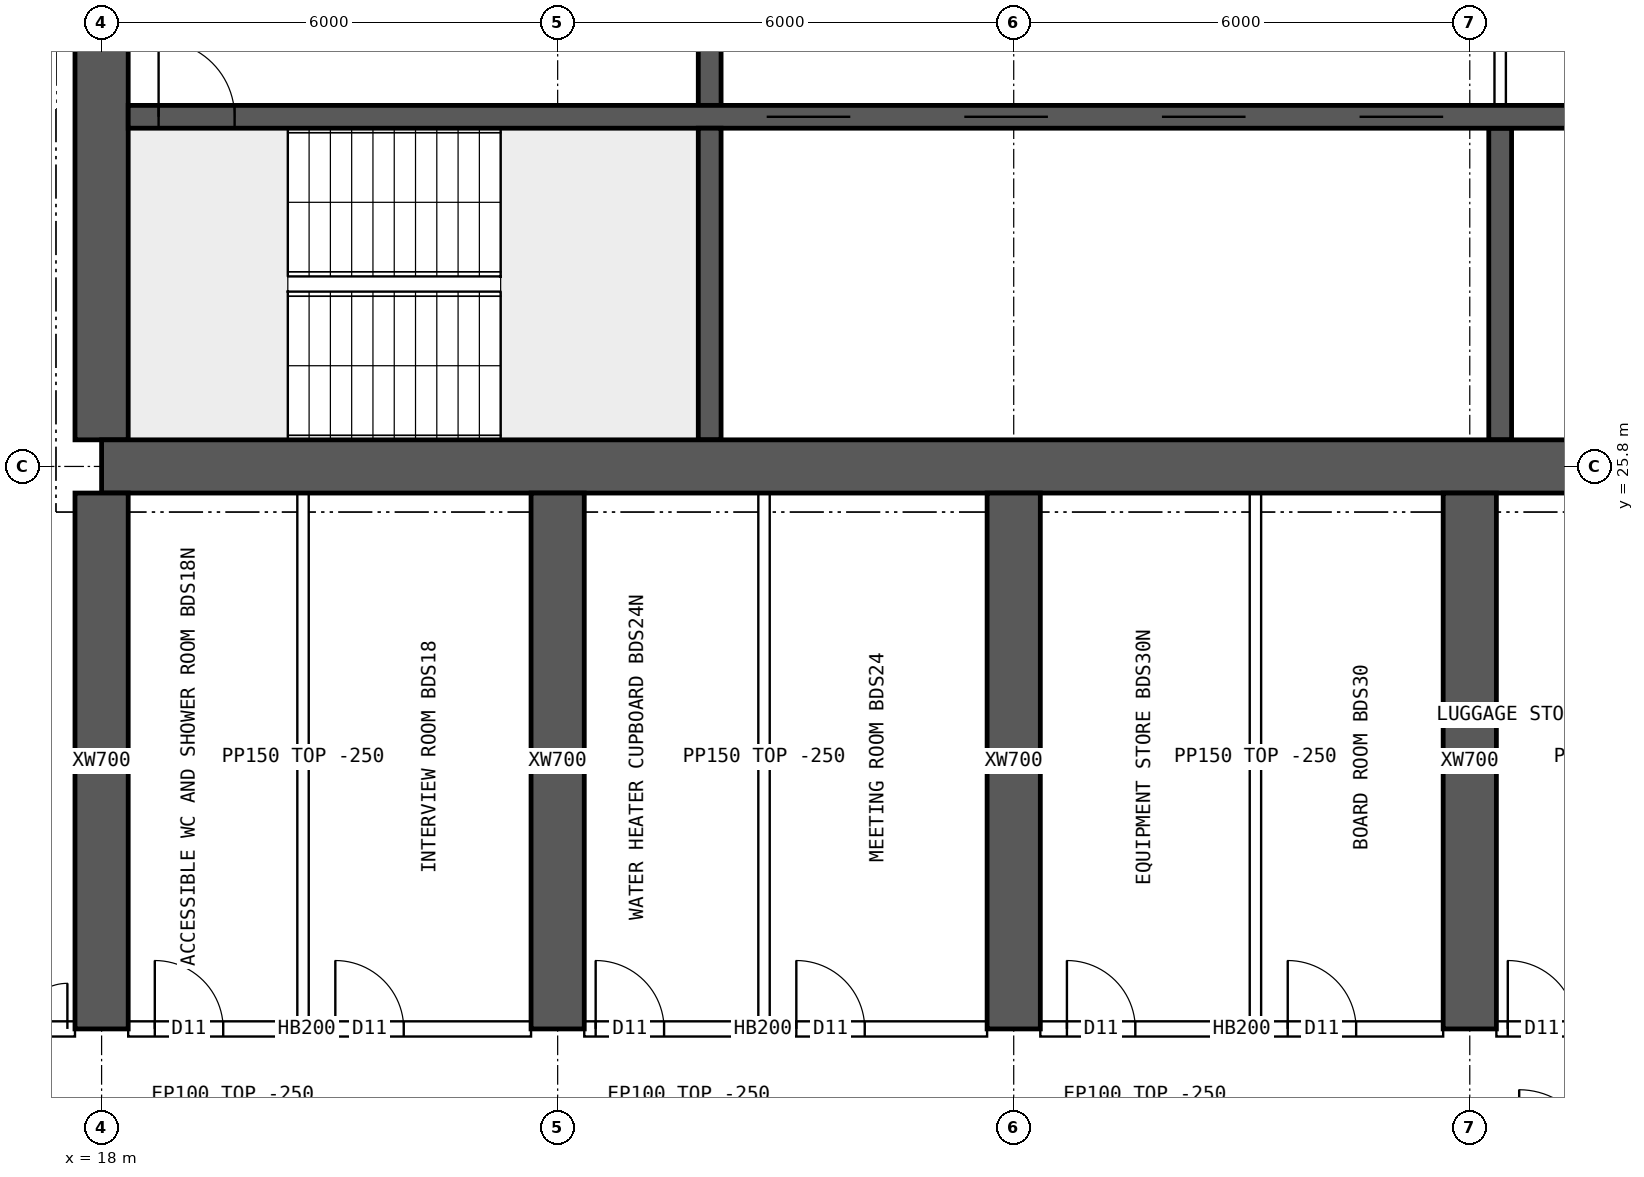
"""IFC4 building model, lengths in metres.
Left out: names, types, materials, properties, quantities, classifications, styles, units other than length and angle.
Written with IfcOpenShell. Run it as: python <this file> out.ifc"""

import sys

from ifc_helpers import new_model, si_unit, direction, frame, frame_2d, origin, place, context, subcontext, project, spatial, rectangle, extrude, element, fill, save


model = new_model("IFC4")
c1 = context("Model", 3, precision=1e-05, world=origin(), true_north=direction((0.0, 1.0)))
c2 = subcontext(c1, "Body", "Model", "MODEL_VIEW")
j1 = project(units=[si_unit("LENGTHUNIT", "METRE"), si_unit("PLANEANGLEUNIT", "RADIAN")], contexts=[c1])
p1 = place(None, origin())
s1 = spatial("IfcSite", under=j1, at=p1, CompositionType="ELEMENT")
p2 = place(p1, origin())
s2 = spatial("IfcBuilding", under=s1, at=p2, CompositionType="ELEMENT")
p3 = place(p2, frame((0.0, 0.0, 239.05)))
s3 = spatial("IfcBuildingStorey", under=s2, at=p3, CompositionType="ELEMENT", Elevation=239.05)
p4 = place(p3, frame((18.0, 25.8, 0.0), z_axis=(0.0, 0.0, 1.0), x_axis=(1.0, 0.0, 0.0)))
e1 = element("IfcWall", 1, at=p4, inside=s3, PredefinedType="SHEAR", context=c2, shape_type="SweptSolid", body=[
    extrude(rectangle(XDim=48.0, YDim=0.7, at=frame_2d((24.0, 0.0))), origin(), (0.0, 0.0, 1.0), 3.75),
])
p5 = place(p3, frame((18.0, 26.15, 0.0), z_axis=(0.0, 0.0, 1.0), x_axis=(0.0, 1.0, 0.0)))
e2 = element("IfcWall", 2, at=p5, inside=s3, PredefinedType="SHEAR", context=c2, shape_type="SweptSolid", body=[
    extrude(rectangle(XDim=11.7, YDim=0.7, at=frame_2d((5.85, 0.0))), origin(), (0.0, 0.0, 1.0), 3.75),
])
p6 = place(p5, frame((5.15, 0.0, 0.0)))
e3 = element("IfcOpeningElement", 3, at=p6, cuts=e2, PredefinedType="OPENING", context=c2, shape_type="SweptSolid", body=[
    extrude(rectangle(XDim=1.2, YDim=2.1, at=frame_2d((0.6, 1.05))), frame((0.0, 0.36, 0.0), z_axis=(0.0, -1.0, 0.0), x_axis=(1.0, 0.0, 0.0)), (0.0, 0.0, 1.0), 0.72),
])
p7 = place(p3, frame((18.35, 30.4, 0.0), z_axis=(0.0, 0.0, 1.0), x_axis=(1.0, 0.0, 0.0)))
e4 = element("IfcWall", 4, at=p7, inside=s3, PredefinedType="SHEAR", context=c2, shape_type="SweptSolid", body=[
    extrude(rectangle(XDim=47.3, YDim=0.3, at=frame_2d((23.65, 0.0))), origin(), (0.0, 0.0, 1.0), 3.75),
])
p8 = place(p7, frame((0.4, 0.0, 0.0)))
e5 = element("IfcOpeningElement", 5, at=p8, cuts=e4, PredefinedType="OPENING", context=c2, shape_type="SweptSolid", body=[
    extrude(rectangle(XDim=1.0, YDim=2.1, at=frame_2d((0.5, 1.05))), frame((0.0, 0.16, 0.0), z_axis=(0.0, -1.0, 0.0), x_axis=(1.0, 0.0, 0.0)), (0.0, 0.0, 1.0), 0.32),
])
p9 = place(p7, frame((45.9, 0.0, 0.0)))
e6 = element("IfcOpeningElement", 6, at=p9, cuts=e4, PredefinedType="OPENING", context=c2, shape_type="SweptSolid", body=[
    extrude(rectangle(XDim=1.0, YDim=2.1, at=frame_2d((0.5, 1.05))), frame((0.0, 0.16, 0.0), z_axis=(0.0, -1.0, 0.0), x_axis=(1.0, 0.0, 0.0)), (0.0, 0.0, 1.0), 0.32),
])
p10 = place(p7, frame((8.4, 0.0, 0.0)))
e7 = element("IfcOpeningElement", 7, at=p10, cuts=e4, PredefinedType="OPENING", context=c2, shape_type="SweptSolid", body=[
    extrude(rectangle(XDim=1.1, YDim=2.1, at=frame_2d((0.55, 1.05))), frame((0.0, 0.16, 0.0), z_axis=(0.0, -1.0, 0.0), x_axis=(1.0, 0.0, 0.0)), (0.0, 0.0, 1.0), 0.32),
])
p11 = place(p7, frame((11.0, 0.0, 0.0)))
e8 = element("IfcOpeningElement", 8, at=p11, cuts=e4, PredefinedType="OPENING", context=c2, shape_type="SweptSolid", body=[
    extrude(rectangle(XDim=1.1, YDim=2.1, at=frame_2d((0.55, 1.05))), frame((0.0, 0.16, 0.0), z_axis=(0.0, -1.0, 0.0), x_axis=(1.0, 0.0, 0.0)), (0.0, 0.0, 1.0), 0.32),
])
p12 = place(p7, frame((13.6, 0.0, 0.0)))
e9 = element("IfcOpeningElement", 9, at=p12, cuts=e4, PredefinedType="OPENING", context=c2, shape_type="SweptSolid", body=[
    extrude(rectangle(XDim=1.1, YDim=2.1, at=frame_2d((0.55, 1.05))), frame((0.0, 0.16, 0.0), z_axis=(0.0, -1.0, 0.0), x_axis=(1.0, 0.0, 0.0)), (0.0, 0.0, 1.0), 0.32),
])
p13 = place(p7, frame((16.2, 0.0, 0.0)))
e10 = element("IfcOpeningElement", 10, at=p13, cuts=e4, PredefinedType="OPENING", context=c2, shape_type="SweptSolid", body=[
    extrude(rectangle(XDim=1.1, YDim=2.1, at=frame_2d((0.55, 1.05))), frame((0.0, 0.16, 0.0), z_axis=(0.0, -1.0, 0.0), x_axis=(1.0, 0.0, 0.0)), (0.0, 0.0, 1.0), 0.32),
])
p14 = place(p7, frame((18.975, 0.0, 0.0)))
e11 = element("IfcOpeningElement", 11, at=p14, cuts=e4, PredefinedType="OPENING", context=c2, shape_type="SweptSolid", body=[
    extrude(rectangle(XDim=0.9, YDim=2.1, at=frame_2d((0.45, 1.05))), frame((0.0, 0.16, 0.0), z_axis=(0.0, -1.0, 0.0), x_axis=(1.0, 0.0, 0.0)), (0.0, 0.0, 1.0), 0.32),
])
p15 = place(p7, frame((24.475, 0.0, 0.0)))
e12 = element("IfcOpeningElement", 12, at=p15, cuts=e4, PredefinedType="OPENING", context=c2, shape_type="SweptSolid", body=[
    extrude(rectangle(XDim=0.9, YDim=2.1, at=frame_2d((0.45, 1.05))), frame((0.0, 0.16, 0.0), z_axis=(0.0, -1.0, 0.0), x_axis=(1.0, 0.0, 0.0)), (0.0, 0.0, 1.0), 0.32),
])
p16 = place(p7, frame((30.267, 0.0, 0.0)))
e13 = element("IfcOpeningElement", 13, at=p16, cuts=e4, PredefinedType="OPENING", context=c2, shape_type="SweptSolid", body=[
    extrude(rectangle(XDim=1.1, YDim=2.1, at=frame_2d((0.55, 1.05))), frame((0.0, 0.16, 0.0), z_axis=(0.0, -1.0, 0.0), x_axis=(1.0, 0.0, 0.0)), (0.0, 0.0, 1.0), 0.32),
])
p17 = place(p7, frame((33.8, 0.0, 0.0)))
e14 = element("IfcOpeningElement", 14, at=p17, cuts=e4, PredefinedType="OPENING", context=c2, shape_type="SweptSolid", body=[
    extrude(rectangle(XDim=1.1, YDim=2.1, at=frame_2d((0.55, 1.05))), frame((0.0, 0.16, 0.0), z_axis=(0.0, -1.0, 0.0), x_axis=(1.0, 0.0, 0.0)), (0.0, 0.0, 1.0), 0.32),
])
p18 = place(p7, frame((37.333, 0.0, 0.0)))
e15 = element("IfcOpeningElement", 15, at=p18, cuts=e4, PredefinedType="OPENING", context=c2, shape_type="SweptSolid", body=[
    extrude(rectangle(XDim=1.1, YDim=2.1, at=frame_2d((0.55, 1.05))), frame((0.0, 0.16, 0.0), z_axis=(0.0, -1.0, 0.0), x_axis=(1.0, 0.0, 0.0)), (0.0, 0.0, 1.0), 0.32),
])
p19 = place(p3, frame((26.0, 26.15, 0.0), z_axis=(0.0, 0.0, 1.0), x_axis=(0.0, 1.0, 0.0)))
e16 = element("IfcWall", 16, at=p19, inside=s3, PredefinedType="SHEAR", context=c2, shape_type="SweptSolid", body=[
    extrude(rectangle(XDim=4.1, YDim=0.3, at=frame_2d((2.05, 0.0))), origin(), (0.0, 0.0, 1.0), 3.75),
])
p20 = place(p3, frame((26.0, 30.55, 0.0), z_axis=(0.0, 0.0, 1.0), x_axis=(0.0, 1.0, 0.0)))
e17 = element("IfcWall", 17, at=p20, inside=s3, PredefinedType="SHEAR", context=c2, shape_type="SweptSolid", body=[
    extrude(rectangle(XDim=3.9, YDim=0.3, at=frame_2d((1.95, 0.0))), origin(), (0.0, 0.0, 1.0), 3.75),
])
p21 = place(p20, frame((1.4, 0.0, 0.0)))
e18 = element("IfcOpeningElement", 18, at=p21, cuts=e17, PredefinedType="OPENING", context=c2, shape_type="SweptSolid", body=[
    extrude(rectangle(XDim=1.2, YDim=2.1, at=frame_2d((0.6, 1.05))), frame((0.0, 0.16, 0.0), z_axis=(0.0, -1.0, 0.0), x_axis=(1.0, 0.0, 0.0)), (0.0, 0.0, 1.0), 0.32),
])
p22 = place(p3, frame((36.4, 26.15, 0.0), z_axis=(0.0, 0.0, 1.0), x_axis=(0.0, 1.0, 0.0)))
e19 = element("IfcWall", 19, at=p22, inside=s3, PredefinedType="SHEAR", context=c2, shape_type="SweptSolid", body=[
    extrude(rectangle(XDim=4.1, YDim=0.3, at=frame_2d((2.05, 0.0))), origin(), (0.0, 0.0, 1.0), 3.75),
])
for number, where, z_axis, x_axis in (
    (20, (18.0, 18.4, 0.0), (0.0, 0.0, 1.0), (0.0, 1.0, 0.0)),
    (21, (24.0, 18.4, 0.0), (0.0, 0.0, 1.0), (0.0, 1.0, 0.0)),
    (22, (30.0, 18.4, 0.0), (0.0, 0.0, 1.0), (0.0, 1.0, 0.0)),
    (23, (36.0, 18.4, 0.0), (0.0, 0.0, 1.0), (0.0, 1.0, 0.0)),
):
    element("IfcWall", number, at=place(p3, frame(where, z_axis=z_axis, x_axis=x_axis)), inside=s3, PredefinedType="SHEAR", context=c2, shape_type="SweptSolid", body=[
        extrude(rectangle(XDim=7.05, YDim=0.7, at=frame_2d((3.525, 0.0))), origin(), (0.0, 0.0, 1.0), 3.75),
    ])
p23 = place(p3, frame((36.4, 30.55, 0.0), z_axis=(0.0, 0.0, 1.0), x_axis=(0.0, 1.0, 0.0)))
e24 = element("IfcWall", 24, at=p23, inside=s3, PredefinedType="SOLIDWALL", context=c2, shape_type="SweptSolid", body=[
    extrude(rectangle(XDim=3.9, YDim=0.15, at=frame_2d((1.95, 0.0))), origin(), (0.0, 0.0, 1.0), 3.5),
])
p24 = place(p23, frame((1.15, 0.0, 0.0)))
e25 = element("IfcOpeningElement", 25, at=p24, cuts=e24, PredefinedType="OPENING", context=c2, shape_type="SweptSolid", body=[
    extrude(rectangle(XDim=1.6, YDim=2.1, at=frame_2d((0.8, 1.05))), frame((0.0, 0.085, 0.0), z_axis=(0.0, -1.0, 0.0), x_axis=(1.0, 0.0, 0.0)), (0.0, 0.0, 1.0), 0.17),
])
p25 = place(p3, frame((15.6, 18.4, 0.0), z_axis=(0.0, 0.0, 1.0), x_axis=(1.0, 0.0, 0.0)))
e26 = element("IfcWall", 26, at=p25, inside=s3, PredefinedType="SOLIDWALL", context=c2, shape_type="SweptSolid", body=[
    extrude(rectangle(XDim=2.05, YDim=0.2, at=frame_2d((1.025, 0.0))), origin(), (0.0, 0.0, 1.0), 3.5),
])
p26 = place(p25, frame((0.75, 0.0, 0.0)))
e27 = element("IfcOpeningElement", 27, at=p26, cuts=e26, PredefinedType="OPENING", context=c2, shape_type="SweptSolid", body=[
    extrude(rectangle(XDim=1.2, YDim=2.1, at=frame_2d((0.6, 1.05))), frame((0.0, 0.11, 0.0), z_axis=(0.0, -1.0, 0.0), x_axis=(1.0, 0.0, 0.0)), (0.0, 0.0, 1.0), 0.22),
])
p27 = place(p3, frame((18.35, 18.4, 0.0), z_axis=(0.0, 0.0, 1.0), x_axis=(1.0, 0.0, 0.0)))
e28 = element("IfcWall", 28, at=p27, inside=s3, PredefinedType="SOLIDWALL", context=c2, shape_type="SweptSolid", body=[
    extrude(rectangle(XDim=5.3, YDim=0.2, at=frame_2d((2.65, 0.0))), origin(), (0.0, 0.0, 1.0), 3.5),
])
p28 = place(p27, frame((0.35, 0.0, 0.0)))
e29 = element("IfcOpeningElement", 29, at=p28, cuts=e28, PredefinedType="OPENING", context=c2, shape_type="SweptSolid", body=[
    extrude(rectangle(XDim=0.9, YDim=2.1, at=frame_2d((0.45, 1.05))), frame((0.0, 0.11, 0.0), z_axis=(0.0, -1.0, 0.0), x_axis=(1.0, 0.0, 0.0)), (0.0, 0.0, 1.0), 0.22),
])
p29 = place(p27, frame((2.725, 0.0, 0.0)))
e30 = element("IfcOpeningElement", 30, at=p29, cuts=e28, PredefinedType="OPENING", context=c2, shape_type="SweptSolid", body=[
    extrude(rectangle(XDim=0.9, YDim=2.1, at=frame_2d((0.45, 1.05))), frame((0.0, 0.11, 0.0), z_axis=(0.0, -1.0, 0.0), x_axis=(1.0, 0.0, 0.0)), (0.0, 0.0, 1.0), 0.22),
])
p30 = place(p3, frame((24.35, 18.4, 0.0), z_axis=(0.0, 0.0, 1.0), x_axis=(1.0, 0.0, 0.0)))
e31 = element("IfcWall", 31, at=p30, inside=s3, PredefinedType="SOLIDWALL", context=c2, shape_type="SweptSolid", body=[
    extrude(rectangle(XDim=5.3, YDim=0.2, at=frame_2d((2.65, 0.0))), origin(), (0.0, 0.0, 1.0), 3.5),
])
p31 = place(p30, frame((0.15, 0.0, 0.0)))
e32 = element("IfcOpeningElement", 32, at=p31, cuts=e31, PredefinedType="OPENING", context=c2, shape_type="SweptSolid", body=[
    extrude(rectangle(XDim=0.9, YDim=2.1, at=frame_2d((0.45, 1.05))), frame((0.0, 0.11, 0.0), z_axis=(0.0, -1.0, 0.0), x_axis=(1.0, 0.0, 0.0)), (0.0, 0.0, 1.0), 0.22),
])
p32 = place(p30, frame((2.79, 0.0, 0.0)))
e33 = element("IfcOpeningElement", 33, at=p32, cuts=e31, PredefinedType="OPENING", context=c2, shape_type="SweptSolid", body=[
    extrude(rectangle(XDim=0.9, YDim=2.1, at=frame_2d((0.45, 1.05))), frame((0.0, 0.11, 0.0), z_axis=(0.0, -1.0, 0.0), x_axis=(1.0, 0.0, 0.0)), (0.0, 0.0, 1.0), 0.22),
])
p33 = place(p3, frame((30.35, 18.4, 0.0), z_axis=(0.0, 0.0, 1.0), x_axis=(1.0, 0.0, 0.0)))
e34 = element("IfcWall", 34, at=p33, inside=s3, PredefinedType="SOLIDWALL", context=c2, shape_type="SweptSolid", body=[
    extrude(rectangle(XDim=5.3, YDim=0.2, at=frame_2d((2.65, 0.0))), origin(), (0.0, 0.0, 1.0), 3.5),
])
p34 = place(p33, frame((0.35, 0.0, 0.0)))
e35 = element("IfcOpeningElement", 35, at=p34, cuts=e34, PredefinedType="OPENING", context=c2, shape_type="SweptSolid", body=[
    extrude(rectangle(XDim=0.9, YDim=2.1, at=frame_2d((0.45, 1.05))), frame((0.0, 0.11, 0.0), z_axis=(0.0, -1.0, 0.0), x_axis=(1.0, 0.0, 0.0)), (0.0, 0.0, 1.0), 0.22),
])
p35 = place(p33, frame((3.255, 0.0, 0.0)))
e36 = element("IfcOpeningElement", 36, at=p35, cuts=e34, PredefinedType="OPENING", context=c2, shape_type="SweptSolid", body=[
    extrude(rectangle(XDim=0.9, YDim=2.1, at=frame_2d((0.45, 1.05))), frame((0.0, 0.11, 0.0), z_axis=(0.0, -1.0, 0.0), x_axis=(1.0, 0.0, 0.0)), (0.0, 0.0, 1.0), 0.22),
])
p36 = place(p3, frame((36.35, 18.4, 0.0), z_axis=(0.0, 0.0, 1.0), x_axis=(1.0, 0.0, 0.0)))
e37 = element("IfcWall", 37, at=p36, inside=s3, PredefinedType="SOLIDWALL", context=c2, shape_type="SweptSolid", body=[
    extrude(rectangle(XDim=5.3, YDim=0.2, at=frame_2d((2.65, 0.0))), origin(), (0.0, 0.0, 1.0), 3.5),
])
p37 = place(p36, frame((0.15, 0.0, 0.0)))
e38 = element("IfcOpeningElement", 38, at=p37, cuts=e37, PredefinedType="OPENING", context=c2, shape_type="SweptSolid", body=[
    extrude(rectangle(XDim=0.9, YDim=2.1, at=frame_2d((0.45, 1.05))), frame((0.0, 0.11, 0.0), z_axis=(0.0, -1.0, 0.0), x_axis=(1.0, 0.0, 0.0)), (0.0, 0.0, 1.0), 0.22),
])
p38 = place(p36, frame((2.25, 0.0, 0.0)))
e39 = element("IfcOpeningElement", 39, at=p38, cuts=e37, PredefinedType="OPENING", context=c2, shape_type="SweptSolid", body=[
    extrude(rectangle(XDim=0.9, YDim=2.1, at=frame_2d((0.45, 1.05))), frame((0.0, 0.11, 0.0), z_axis=(0.0, -1.0, 0.0), x_axis=(1.0, 0.0, 0.0)), (0.0, 0.0, 1.0), 0.22),
])
for number, where, z_axis, x_axis in (
    (40, (20.65, 18.5, 0.0), (0.0, 0.0, 1.0), (0.0, 1.0, 0.0)),
    (41, (26.715, 18.5, 0.0), (0.0, 0.0, 1.0), (0.0, 1.0, 0.0)),
    (42, (33.18, 18.5, 0.0), (0.0, 0.0, 1.0), (0.0, 1.0, 0.0)),
):
    element("IfcWall", number, at=place(p3, frame(where, z_axis=z_axis, x_axis=x_axis)), inside=s3, PredefinedType="PARTITIONING", context=c2, shape_type="SweptSolid", body=[
        extrude(rectangle(XDim=6.95, YDim=0.15, at=frame_2d((3.475, 0.0))), origin(), (0.0, 0.0, 1.0), 3.5),
    ])
p39 = place(p8, origin())
e43 = element("IfcDoor", 43, at=p39, inside=s3, OperationType="SINGLE_SWING_LEFT", PredefinedType="DOOR", context=c2, shape_type="SweptSolid", body=[
    extrude(rectangle(XDim=1.0, YDim=2.1, at=frame_2d((0.5, 1.05))), frame((0.0, 0.025, 0.0), z_axis=(0.0, -1.0, 0.0), x_axis=(1.0, 0.0, 0.0)), (0.0, 0.0, 1.0), 0.05),
])
fill(e5, e43)
p40 = place(p10, origin())
e44 = element("IfcDoor", 44, at=p40, inside=s3, OperationType="DOUBLE_DOOR_SLIDING", PredefinedType="DOOR", context=c2, shape_type="SweptSolid", body=[
    extrude(rectangle(XDim=1.1, YDim=2.1, at=frame_2d((0.55, 1.05))), frame((0.0, 0.025, 0.0), z_axis=(0.0, -1.0, 0.0), x_axis=(1.0, 0.0, 0.0)), (0.0, 0.0, 1.0), 0.05),
])
fill(e7, e44)
p41 = place(p11, origin())
e45 = element("IfcDoor", 45, at=p41, inside=s3, OperationType="DOUBLE_DOOR_SLIDING", PredefinedType="DOOR", context=c2, shape_type="SweptSolid", body=[
    extrude(rectangle(XDim=1.1, YDim=2.1, at=frame_2d((0.55, 1.05))), frame((0.0, 0.025, 0.0), z_axis=(0.0, -1.0, 0.0), x_axis=(1.0, 0.0, 0.0)), (0.0, 0.0, 1.0), 0.05),
])
fill(e8, e45)
p42 = place(p12, origin())
e46 = element("IfcDoor", 46, at=p42, inside=s3, OperationType="DOUBLE_DOOR_SLIDING", PredefinedType="DOOR", context=c2, shape_type="SweptSolid", body=[
    extrude(rectangle(XDim=1.1, YDim=2.1, at=frame_2d((0.55, 1.05))), frame((0.0, 0.025, 0.0), z_axis=(0.0, -1.0, 0.0), x_axis=(1.0, 0.0, 0.0)), (0.0, 0.0, 1.0), 0.05),
])
fill(e9, e46)
p43 = place(p13, origin())
e47 = element("IfcDoor", 47, at=p43, inside=s3, OperationType="DOUBLE_DOOR_SLIDING", PredefinedType="DOOR", context=c2, shape_type="SweptSolid", body=[
    extrude(rectangle(XDim=1.1, YDim=2.1, at=frame_2d((0.55, 1.05))), frame((0.0, 0.025, 0.0), z_axis=(0.0, -1.0, 0.0), x_axis=(1.0, 0.0, 0.0)), (0.0, 0.0, 1.0), 0.05),
])
fill(e10, e47)
p44 = place(p26, origin())
e48 = element("IfcDoor", 48, at=p44, inside=s3, OperationType="DOUBLE_DOOR_SINGLE_SWING", PredefinedType="DOOR", context=c2, shape_type="SweptSolid", body=[
    extrude(rectangle(XDim=1.2, YDim=2.1, at=frame_2d((0.6, 1.05))), frame((0.0, 0.025, 0.0), z_axis=(0.0, -1.0, 0.0), x_axis=(1.0, 0.0, 0.0)), (0.0, 0.0, 1.0), 0.05),
])
fill(e27, e48)
p45 = place(p28, origin())
e49 = element("IfcDoor", 49, at=p45, inside=s3, OperationType="SINGLE_SWING_LEFT", PredefinedType="DOOR", context=c2, shape_type="SweptSolid", body=[
    extrude(rectangle(XDim=0.9, YDim=2.1, at=frame_2d((0.45, 1.05))), frame((0.0, 0.025, 0.0), z_axis=(0.0, -1.0, 0.0), x_axis=(1.0, 0.0, 0.0)), (0.0, 0.0, 1.0), 0.05),
])
fill(e29, e49)
p46 = place(p29, origin())
e50 = element("IfcDoor", 50, at=p46, inside=s3, OperationType="SINGLE_SWING_LEFT", PredefinedType="DOOR", context=c2, shape_type="SweptSolid", body=[
    extrude(rectangle(XDim=0.9, YDim=2.1, at=frame_2d((0.45, 1.05))), frame((0.0, 0.025, 0.0), z_axis=(0.0, -1.0, 0.0), x_axis=(1.0, 0.0, 0.0)), (0.0, 0.0, 1.0), 0.05),
])
fill(e30, e50)
p47 = place(p31, origin())
e51 = element("IfcDoor", 51, at=p47, inside=s3, OperationType="SINGLE_SWING_LEFT", PredefinedType="DOOR", context=c2, shape_type="SweptSolid", body=[
    extrude(rectangle(XDim=0.9, YDim=2.1, at=frame_2d((0.45, 1.05))), frame((0.0, 0.025, 0.0), z_axis=(0.0, -1.0, 0.0), x_axis=(1.0, 0.0, 0.0)), (0.0, 0.0, 1.0), 0.05),
])
fill(e32, e51)
p48 = place(p32, origin())
e52 = element("IfcDoor", 52, at=p48, inside=s3, OperationType="SINGLE_SWING_LEFT", PredefinedType="DOOR", context=c2, shape_type="SweptSolid", body=[
    extrude(rectangle(XDim=0.9, YDim=2.1, at=frame_2d((0.45, 1.05))), frame((0.0, 0.025, 0.0), z_axis=(0.0, -1.0, 0.0), x_axis=(1.0, 0.0, 0.0)), (0.0, 0.0, 1.0), 0.05),
])
fill(e33, e52)
p49 = place(p34, origin())
e53 = element("IfcDoor", 53, at=p49, inside=s3, OperationType="SINGLE_SWING_LEFT", PredefinedType="DOOR", context=c2, shape_type="SweptSolid", body=[
    extrude(rectangle(XDim=0.9, YDim=2.1, at=frame_2d((0.45, 1.05))), frame((0.0, 0.025, 0.0), z_axis=(0.0, -1.0, 0.0), x_axis=(1.0, 0.0, 0.0)), (0.0, 0.0, 1.0), 0.05),
])
fill(e35, e53)
p50 = place(p35, origin())
e54 = element("IfcDoor", 54, at=p50, inside=s3, OperationType="SINGLE_SWING_LEFT", PredefinedType="DOOR", context=c2, shape_type="SweptSolid", body=[
    extrude(rectangle(XDim=0.9, YDim=2.1, at=frame_2d((0.45, 1.05))), frame((0.0, 0.025, 0.0), z_axis=(0.0, -1.0, 0.0), x_axis=(1.0, 0.0, 0.0)), (0.0, 0.0, 1.0), 0.05),
])
fill(e36, e54)
p51 = place(p37, origin())
e55 = element("IfcDoor", 55, at=p51, inside=s3, OperationType="SINGLE_SWING_LEFT", PredefinedType="DOOR", context=c2, shape_type="SweptSolid", body=[
    extrude(rectangle(XDim=0.9, YDim=2.1, at=frame_2d((0.45, 1.05))), frame((0.0, 0.025, 0.0), z_axis=(0.0, -1.0, 0.0), x_axis=(1.0, 0.0, 0.0)), (0.0, 0.0, 1.0), 0.05),
])
fill(e38, e55)
save(model, sys.argv[1])
